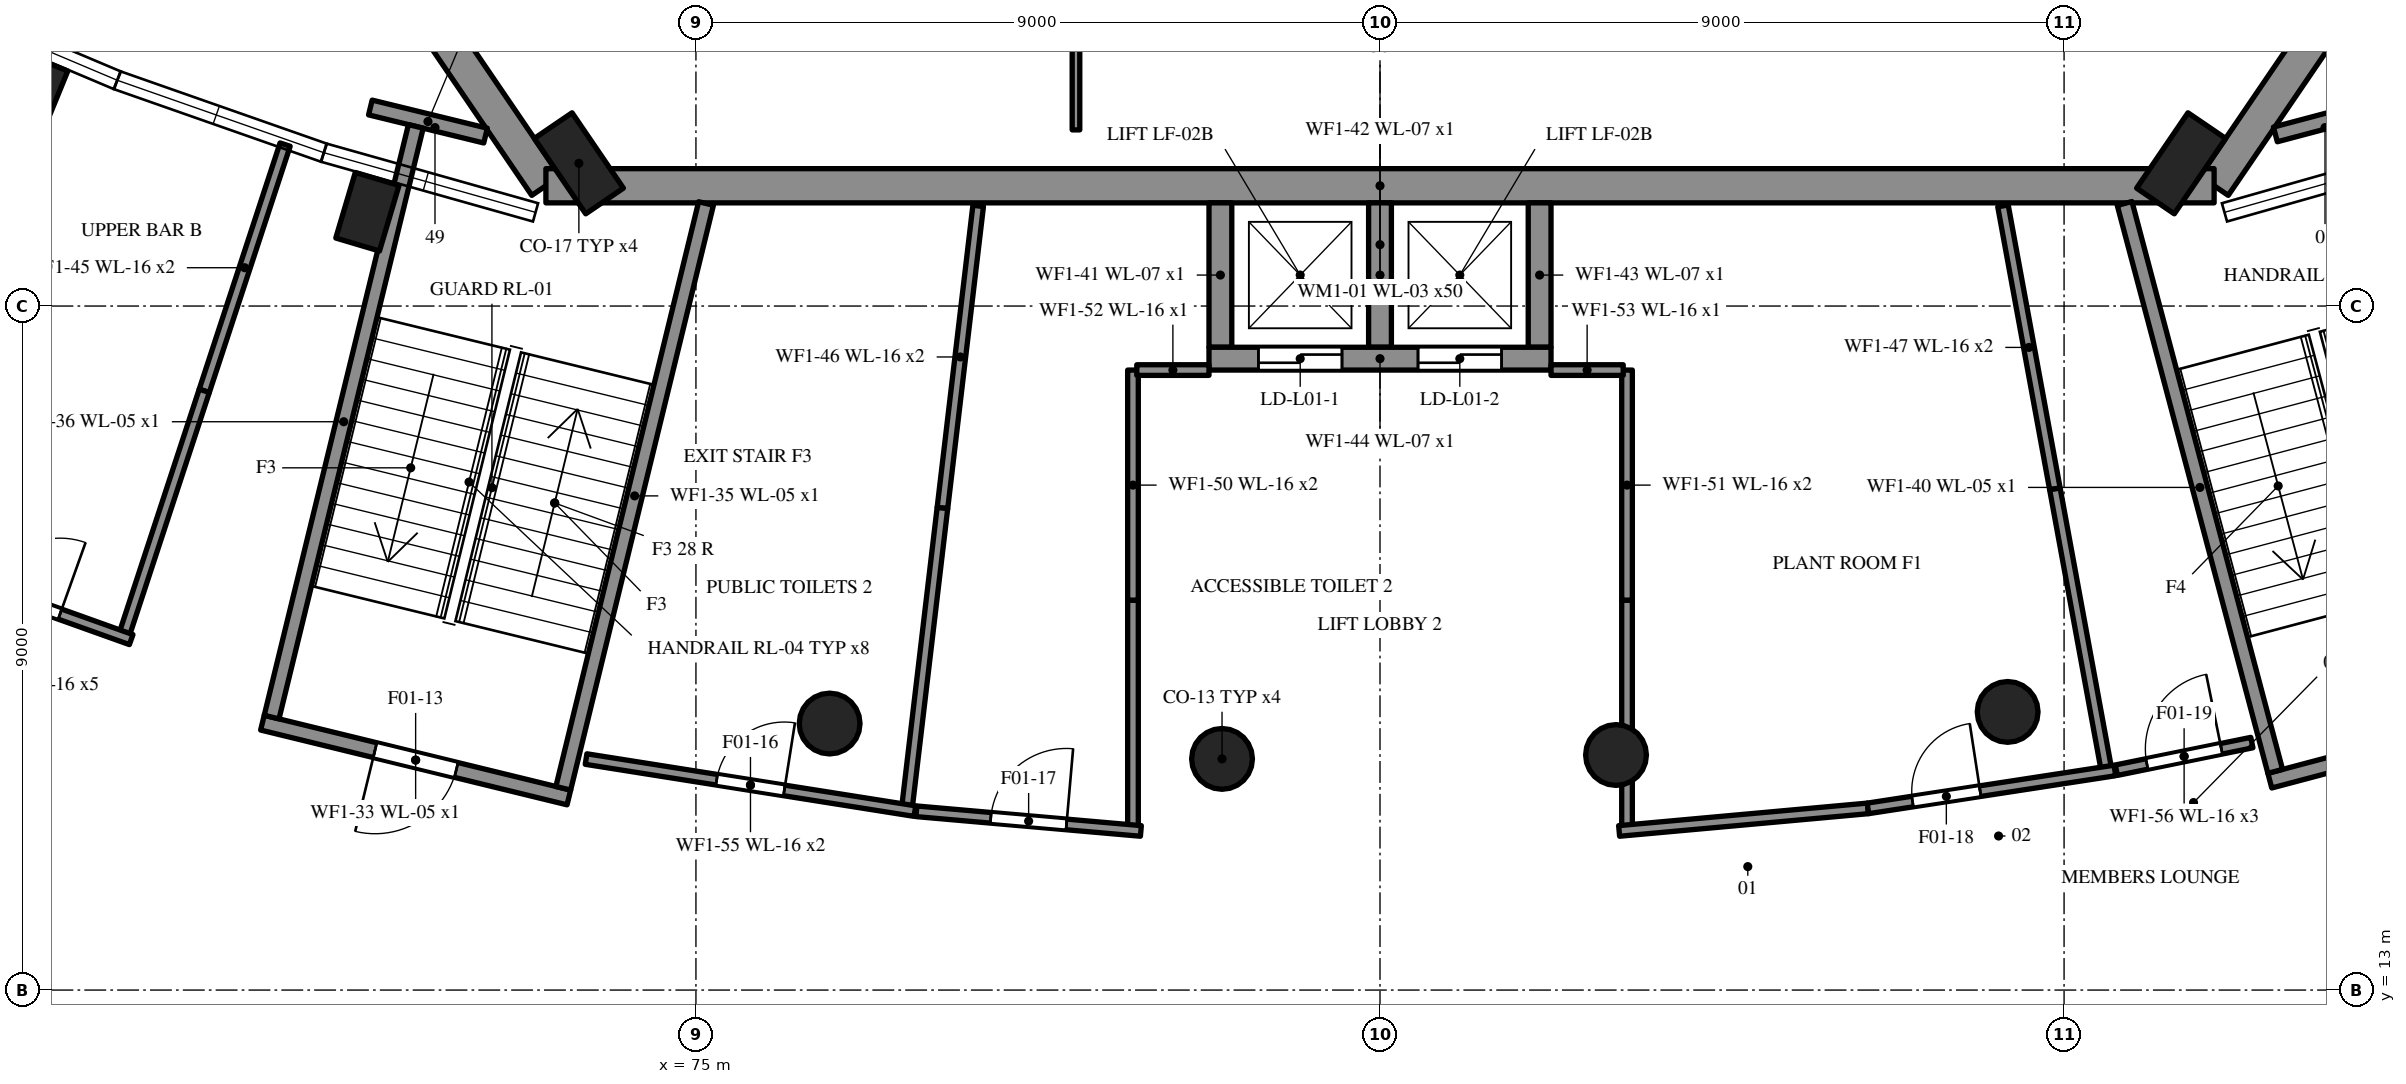
"""IFC4 building model, lengths in metres.
Left out: names, types, materials, properties, quantities, classifications, styles, units other than length and angle.
Written with IfcOpenShell. Run it as: python <this file> out.ifc"""

import sys

from ifc_helpers import new_model, si_unit, direction, frame, frame_2d, origin, origin_2d, place, context, subcontext, project, spatial, rectangle, circle, extrude, element, fill, save


model = new_model("IFC4")
c1 = context("Model", 3, precision=1e-05, world=origin(), true_north=direction((0.0, 1.0)))
c2 = subcontext(c1, "Body", "Model", "MODEL_VIEW")
j1 = project(units=[si_unit("LENGTHUNIT", "METRE"), si_unit("PLANEANGLEUNIT", "RADIAN")], contexts=[c1])
p1 = place(None, origin())
s1 = spatial("IfcSite", under=j1, at=p1, CompositionType="ELEMENT")
p2 = place(p1, origin())
s2 = spatial("IfcBuilding", under=s1, at=p2, CompositionType="ELEMENT")
p3 = place(p2, frame((0.0, 0.0, 5.4)))
s3 = spatial("IfcBuildingStorey", under=s2, at=p3, CompositionType="ELEMENT", Elevation=5.4)
for number, where, z_axis, x_axis in (
    (1, (94.974, 23.583, 0.0), (0.0, 0.0, 1.0), (0.563, 0.826, 0.0)),
    (2, (71.389, 25.986, 0.0), (0.0, 0.0, 1.0), (0.563, -0.826, 0.0)),
):
    element("IfcWall", number, at=place(p3, frame(where, z_axis=z_axis, x_axis=x_axis)), inside=s3, PredefinedType="SOLIDWALL", context=c2, shape_type="SweptSolid", body=[
        extrude(rectangle(XDim=2.908, YDim=0.45, at=frame_2d((1.454, 0.0))), origin(), (0.0, 0.0, 1.0), 4.8),
    ])
p4 = place(p3, frame((73.026, 23.583, 0.0), z_axis=(0.0, 0.0, 1.0), x_axis=(1.0, 0.0, 0.0)))
e3 = element("IfcWall", 3, at=p4, inside=s3, PredefinedType="SOLIDWALL", context=c2, shape_type="SweptSolid", body=[
    extrude(rectangle(XDim=21.948, YDim=0.45, at=frame_2d((10.974, 0.0))), origin(), (0.0, 0.0, 1.0), 4.8),
])
for number, where, z_axis, x_axis in (
    (4, (94.54, 23.878, 0.0), (0.0, 0.0, 1.0), (0.563, 0.826, 0.0)),
    (5, (73.46, 23.878, 0.0), (0.0, 0.0, 1.0), (0.563, -0.826, 0.0)),
):
    element("IfcColumn", number, at=place(p3, frame(where, z_axis=z_axis, x_axis=x_axis)), inside=s3, PredefinedType="PILASTER", context=c2, shape_type="SweptSolid", body=[
        extrude(rectangle(XDim=1.2, YDim=0.6, at=origin_2d()), origin(), (0.0, 0.0, 1.0), 4.8),
    ])
for number, where, z_axis, x_axis in (
    (6, (66.287, 24.79, 0.0), (0.0, 0.0, 1.0), (-0.379, -0.925, 0.0)),
    (7, (70.677, 23.241, 0.0), (0.0, 0.0, 1.0), (-0.285, -0.958, 0.0)),
):
    element("IfcColumn", number, at=place(p3, frame(where, z_axis=z_axis, x_axis=x_axis)), inside=s3, PredefinedType="PILASTER", context=c2, shape_type="SweptSolid", body=[
        extrude(rectangle(XDim=0.9, YDim=0.6, at=origin_2d()), origin(), (0.0, 0.0, 1.0), 4.8),
    ])
for number, where, z_axis, x_axis in (
    (8, (76.759, 16.507, 0.0), (0.0, 0.0, 1.0), (1.0, 0.0, 0.0)),
    (9, (81.922, 16.042, 0.0), (0.0, 0.0, 1.0), (1.0, 0.0, 0.0)),
    (10, (87.105, 16.093, 0.0), (0.0, 0.0, 1.0), (1.0, 0.0, 0.0)),
    (11, (92.258, 16.66, 0.0), (0.0, 0.0, 1.0), (1.0, 0.0, 0.0)),
):
    element("IfcColumn", number, at=place(p3, frame(where, z_axis=z_axis, x_axis=x_axis)), inside=s3, PredefinedType="COLUMN", context=c2, shape_type="SweptSolid", body=[
        extrude(circle(Radius=0.4, at=origin_2d()), origin(), (0.0, 0.0, 1.0), 4.8),
    ])
p5 = place(p3, frame((80.0, 24.318, 0.0), z_axis=(0.0, 0.0, 1.0), x_axis=(0.0, 1.0, 0.0)))
e12 = element("IfcWall", 12, at=p5, inside=s3, PredefinedType="PARTITIONING", context=c2, shape_type="SweptSolid", body=[
    extrude(rectangle(XDim=5.012, YDim=0.1, at=frame_2d((2.506, 0.0))), origin(), (0.0, 0.0, 1.0), 4.55),
])
p6 = place(p3, frame((73.328, 15.534, 0.0), z_axis=(0.0, 0.0, 1.0), x_axis=(-0.97147374422, 0.237147136374, 0.0)))
e13 = element("IfcWall", 13, at=p6, inside=s3, PredefinedType="SHEAR", context=c2, shape_type="SweptSolid", body=[
    extrude(rectangle(XDim=4.15, YDim=0.2, at=frame_2d((2.075, 0.0))), origin(), (0.0, 0.0, 1.0), 4.8),
])
p7 = place(p6, frame((1.525, 0.0, 0.0)))
e14 = element("IfcOpeningElement", 14, at=p7, cuts=e13, PredefinedType="OPENING", context=c2, shape_type="SweptSolid", body=[
    extrude(rectangle(XDim=1.1, YDim=2.1, at=frame_2d((0.55, 1.05))), frame((0.0, 0.11, 0.0), z_axis=(0.0, -1.0, 0.0), x_axis=(1.0, 0.0, 0.0)), (0.0, 0.0, 1.0), 0.22),
])
p8 = place(p3, frame((72.232, 24.242, 0.0), z_axis=(0.0, 0.0, 1.0), x_axis=(-0.971444715638, 0.237266020446, 0.0)))
e15 = element("IfcWall", 15, at=p8, inside=s3, PredefinedType="SHEAR", context=c2, shape_type="SweptSolid", body=[
    extrude(rectangle(XDim=1.56, YDim=0.2, at=frame_2d((0.78, 0.0))), origin(), (0.0, 0.0, 1.0), 4.8),
])
p9 = place(p3, frame((73.255, 15.655, 0.0), z_axis=(0.0, 0.0, 1.0), x_axis=(0.237142809453, 0.971474800458, 0.0)))
e16 = element("IfcWall", 16, at=p9, inside=s3, PredefinedType="SHEAR", context=c2, shape_type="SweptSolid", body=[
    extrude(rectangle(XDim=7.92, YDim=0.2, at=frame_2d((3.96, 0.0))), origin(), (0.0, 0.0, 1.0), 4.8),
])
p10 = place(p3, frame((69.417, 16.592, 0.0), z_axis=(0.0, 0.0, 1.0), x_axis=(0.2371535898, 0.971472168847, 0.0)))
e17 = element("IfcWall", 17, at=p10, inside=s3, PredefinedType="SHEAR", context=c2, shape_type="SweptSolid", body=[
    extrude(rectangle(XDim=8.0, YDim=0.2, at=frame_2d((4.0, 0.0))), origin(), (0.0, 0.0, 1.0), 4.8),
])
p11 = place(p3, frame((99.718, 16.819, 0.0), z_axis=(0.0, 0.0, 1.0), x_axis=(-0.966590417756, -0.256325894715, 0.0)))
e18 = element("IfcWall", 18, at=p11, inside=s3, PredefinedType="SHEAR", context=c2, shape_type="SweptSolid", body=[
    extrude(rectangle(XDim=4.15, YDim=0.2, at=frame_2d((2.075, 0.0))), origin(), (0.0, 0.0, 1.0), 4.8),
])
p12 = place(p11, frame((1.525, 0.0, 0.0)))
e19 = element("IfcOpeningElement", 19, at=p12, cuts=e18, PredefinedType="OPENING", context=c2, shape_type="SweptSolid", body=[
    extrude(rectangle(XDim=1.1, YDim=2.1, at=frame_2d((0.55, 1.05))), frame((0.0, 0.11, 0.0), z_axis=(0.0, -1.0, 0.0), x_axis=(1.0, 0.0, 0.0)), (0.0, 0.0, 1.0), 0.22),
])
p13 = place(p3, frame((98.138, 24.884, 0.0), z_axis=(0.0, 0.0, 1.0), x_axis=(-0.966582812495, -0.256354572009, 0.0)))
e20 = element("IfcWall", 20, at=p13, inside=s3, PredefinedType="SHEAR", context=c2, shape_type="SweptSolid", body=[
    extrude(rectangle(XDim=2.44, YDim=0.2, at=frame_2d((1.22, 0.0))), origin(), (0.0, 0.0, 1.0), 4.8),
])
p14 = place(p3, frame((95.778, 15.878, 0.0), z_axis=(0.0, 0.0, 1.0), x_axis=(-0.256333531377, 0.966588392591, 0.0)))
e21 = element("IfcWall", 21, at=p14, inside=s3, PredefinedType="SHEAR", context=c2, shape_type="SweptSolid", body=[
    extrude(rectangle(XDim=7.73, YDim=0.2, at=frame_2d((3.865, 0.0))), origin(), (0.0, 0.0, 1.0), 4.8),
])
for number, where, z_axis, x_axis in (
    (22, (81.9, 21.458, 0.0), (0.0, 0.0, 1.0), (0.0, 1.0, 0.0)),
    (23, (84.0, 21.458, 0.0), (0.0, 0.0, 1.0), (0.0, 1.0, 0.0)),
    (24, (86.1, 21.458, 0.0), (0.0, 0.0, 1.0), (0.0, 1.0, 0.0)),
):
    element("IfcWall", number, at=place(p3, frame(where, z_axis=z_axis, x_axis=x_axis)), inside=s3, PredefinedType="SHEAR", context=c2, shape_type="SweptSolid", body=[
        extrude(rectangle(XDim=1.9, YDim=0.3, at=frame_2d((0.95, 0.0))), origin(), (0.0, 0.0, 1.0), 4.8),
    ])
p15 = place(p3, frame((81.75, 21.308, 0.0), z_axis=(0.0, 0.0, 1.0), x_axis=(1.0, 0.0, 0.0)))
e25 = element("IfcWall", 25, at=p15, inside=s3, PredefinedType="SHEAR", context=c2, shape_type="SweptSolid", body=[
    extrude(rectangle(XDim=4.5, YDim=0.3, at=frame_2d((2.25, 0.0))), origin(), (0.0, 0.0, 1.0), 4.8),
])
p16 = place(p15, frame((0.65, 0.0, 0.0)))
e26 = element("IfcOpeningElement", 26, at=p16, cuts=e25, PredefinedType="OPENING", context=c2, shape_type="SweptSolid", body=[
    extrude(rectangle(XDim=1.1, YDim=2.2, at=frame_2d((0.55, 1.1))), frame((0.0, 0.16, 0.0), z_axis=(0.0, -1.0, 0.0), x_axis=(1.0, 0.0, 0.0)), (0.0, 0.0, 1.0), 0.32),
])
p17 = place(p15, frame((2.75, 0.0, 0.0)))
e27 = element("IfcOpeningElement", 27, at=p17, cuts=e25, PredefinedType="OPENING", context=c2, shape_type="SweptSolid", body=[
    extrude(rectangle(XDim=1.1, YDim=2.2, at=frame_2d((0.55, 1.1))), frame((0.0, 0.16, 0.0), z_axis=(0.0, -1.0, 0.0), x_axis=(1.0, 0.0, 0.0)), (0.0, 0.0, 1.0), 0.32),
])
p18 = place(p3, frame((69.595, 24.124, 0.0), z_axis=(0.0, 0.0, 1.0), x_axis=(-0.311928968211, -0.950105425093, 0.0)))
e28 = element("IfcWall", 28, at=p18, inside=s3, PredefinedType="PARTITIONING", context=c2, shape_type="SweptSolid", body=[
    extrude(rectangle(XDim=3.41, YDim=0.14, at=frame_2d((1.705, 0.0))), origin(), (0.0, 0.0, 1.0), 4.634),
])
p19 = place(p3, frame((68.531, 20.884, 0.0), z_axis=(0.0, 0.0, 1.0), x_axis=(-0.311917422886, -0.950109215459, 0.0)))
e29 = element("IfcWall", 29, at=p19, inside=s3, PredefinedType="PARTITIONING", context=c2, shape_type="SweptSolid", body=[
    extrude(rectangle(XDim=3.35, YDim=0.14, at=frame_2d((1.675, 0.0))), origin(), (0.0, 0.0, 1.0), 4.634),
])
p20 = place(p3, frame((78.713, 23.318, 0.0), z_axis=(0.0, 0.0, 1.0), x_axis=(-0.117524162316, -0.993070023348, 0.0)))
e30 = element("IfcWall", 30, at=p20, inside=s3, PredefinedType="PARTITIONING", context=c2, shape_type="SweptSolid", body=[
    extrude(rectangle(XDim=4.003, YDim=0.14, at=frame_2d((2.001, 0.0))), origin(), (0.0, 0.0, 1.0), 4.58),
])
p21 = place(p3, frame((78.243, 19.342, 0.0), z_axis=(0.0, 0.0, 1.0), x_axis=(-0.117462752038, -0.993077288978, 0.0)))
e31 = element("IfcWall", 31, at=p21, inside=s3, PredefinedType="PARTITIONING", context=c2, shape_type="SweptSolid", body=[
    extrude(rectangle(XDim=3.943, YDim=0.14, at=frame_2d((1.971, 0.0))), origin(), (0.0, 0.0, 1.0), 4.58),
])
p22 = place(p3, frame((92.196, 23.318, 0.0), z_axis=(0.0, 0.0, 1.0), x_axis=(0.180428728445, -0.983588061107, 0.0)))
e32 = element("IfcWall", 32, at=p22, inside=s3, PredefinedType="PARTITIONING", context=c2, shape_type="SweptSolid", body=[
    extrude(rectangle(XDim=3.786, YDim=0.14, at=frame_2d((1.893, 0.0))), origin(), (0.0, 0.0, 1.0), 4.58),
])
p23 = place(p3, frame((92.879, 19.594, 0.0), z_axis=(0.0, 0.0, 1.0), x_axis=(0.18037858071, -0.983597258852, 0.0)))
e33 = element("IfcWall", 33, at=p23, inside=s3, PredefinedType="PARTITIONING", context=c2, shape_type="SweptSolid", body=[
    extrude(rectangle(XDim=3.726, YDim=0.14, at=frame_2d((1.863, 0.0))), origin(), (0.0, 0.0, 1.0), 4.58),
])
p24 = place(p3, frame((80.75, 15.163, 0.0), z_axis=(0.0, 0.0, 1.0), x_axis=(0.0, 1.0, 0.0)))
e34 = element("IfcWall", 34, at=p24, inside=s3, PredefinedType="PARTITIONING", context=c2, shape_type="SweptSolid", body=[
    extrude(rectangle(XDim=2.967, YDim=0.14, at=frame_2d((1.484, 0.0))), origin(), (0.0, 0.0, 1.0), 4.58),
])
p25 = place(p3, frame((80.75, 18.13, 0.0), z_axis=(0.0, 0.0, 1.0), x_axis=(0.0, 1.0, 0.0)))
e35 = element("IfcWall", 35, at=p25, inside=s3, PredefinedType="PARTITIONING", context=c2, shape_type="SweptSolid", body=[
    extrude(rectangle(XDim=3.027, YDim=0.14, at=frame_2d((1.514, 0.0))), origin(), (0.0, 0.0, 1.0), 4.58),
])
p26 = place(p3, frame((87.25, 15.163, 0.0), z_axis=(0.0, 0.0, 1.0), x_axis=(0.0, 1.0, 0.0)))
e36 = element("IfcWall", 36, at=p26, inside=s3, PredefinedType="PARTITIONING", context=c2, shape_type="SweptSolid", body=[
    extrude(rectangle(XDim=2.967, YDim=0.14, at=frame_2d((1.484, 0.0))), origin(), (0.0, 0.0, 1.0), 4.58),
])
p27 = place(p3, frame((87.25, 18.13, 0.0), z_axis=(0.0, 0.0, 1.0), x_axis=(0.0, 1.0, 0.0)))
e37 = element("IfcWall", 37, at=p27, inside=s3, PredefinedType="PARTITIONING", context=c2, shape_type="SweptSolid", body=[
    extrude(rectangle(XDim=3.027, YDim=0.14, at=frame_2d((1.514, 0.0))), origin(), (0.0, 0.0, 1.0), 4.58),
])
for number, where, z_axis, x_axis in (
    (38, (80.8, 21.158, 0.0), (0.0, 0.0, 1.0), (1.0, 0.0, 0.0)),
    (39, (86.25, 21.158, 0.0), (0.0, 0.0, 1.0), (1.0, 0.0, 0.0)),
):
    element("IfcWall", number, at=place(p3, frame(where, z_axis=z_axis, x_axis=x_axis)), inside=s3, PredefinedType="PARTITIONING", context=c2, shape_type="SweptSolid", body=[
        extrude(rectangle(XDim=0.95, YDim=0.14, at=frame_2d((0.475, 0.0))), origin(), (0.0, 0.0, 1.0), 4.58),
    ])
p28 = place(p3, frame((64.754, 18.618, 0.0), z_axis=(0.0, 0.0, 1.0), x_axis=(0.941592174621, -0.336755366242, 0.0)))
e40 = element("IfcWall", 40, at=p28, inside=s3, PredefinedType="PARTITIONING", context=c2, shape_type="SweptSolid", body=[
    extrude(rectangle(XDim=2.99, YDim=0.14, at=frame_2d((1.495, 0.0))), origin(), (0.0, 0.0, 1.0), 4.634),
])
p29 = place(p28, frame((0.995, 0.0, 0.0)))
e41 = element("IfcOpeningElement", 41, at=p29, cuts=e40, PredefinedType="OPENING", context=c2, shape_type="SweptSolid", body=[
    extrude(rectangle(XDim=1.0, YDim=2.1, at=frame_2d((0.5, 1.05))), frame((0.0, 0.08, 0.0), z_axis=(0.0, -1.0, 0.0), x_axis=(1.0, 0.0, 0.0)), (0.0, 0.0, 1.0), 0.16),
])
p30 = place(p3, frame((73.554, 16.04, 0.0), z_axis=(0.0, 0.0, 1.0), x_axis=(0.987693268679, -0.156403347173, 0.0)))
e42 = element("IfcWall", 42, at=p30, inside=s3, PredefinedType="PARTITIONING", context=c2, shape_type="SweptSolid", body=[
    extrude(rectangle(XDim=4.38, YDim=0.14, at=frame_2d((2.19, 0.0))), origin(), (0.0, 0.0, 1.0), 4.58),
])
p31 = place(p30, frame((1.74, 0.0, 0.0)))
e43 = element("IfcOpeningElement", 43, at=p31, cuts=e42, PredefinedType="OPENING", context=c2, shape_type="SweptSolid", body=[
    extrude(rectangle(XDim=0.9, YDim=2.1, at=frame_2d((0.45, 1.05))), frame((0.0, 0.08, 0.0), z_axis=(0.0, -1.0, 0.0), x_axis=(1.0, 0.0, 0.0)), (0.0, 0.0, 1.0), 0.16),
])
p32 = place(p3, frame((77.9, 15.352, 0.0), z_axis=(0.0, 0.0, 1.0), x_axis=(0.996183521579, -0.087283396667, 0.0)))
e44 = element("IfcWall", 44, at=p32, inside=s3, PredefinedType="PARTITIONING", context=c2, shape_type="SweptSolid", body=[
    extrude(rectangle(XDim=2.965, YDim=0.14, at=frame_2d((1.482, 0.0))), origin(), (0.0, 0.0, 1.0), 4.58),
])
p33 = place(p32, frame((0.982, 0.0, 0.0)))
e45 = element("IfcOpeningElement", 45, at=p33, cuts=e44, PredefinedType="OPENING", context=c2, shape_type="SweptSolid", body=[
    extrude(rectangle(XDim=1.0, YDim=2.1, at=frame_2d((0.5, 1.05))), frame((0.0, 0.08, 0.0), z_axis=(0.0, -1.0, 0.0), x_axis=(1.0, 0.0, 0.0)), (0.0, 0.0, 1.0), 0.16),
])
p34 = place(p3, frame((87.146, 15.094, 0.0), z_axis=(0.0, 0.0, 1.0), x_axis=(0.995913271916, 0.090314754169, 0.0)))
e46 = element("IfcWall", 46, at=p34, inside=s3, PredefinedType="PARTITIONING", context=c2, shape_type="SweptSolid", body=[
    extrude(rectangle(XDim=3.287, YDim=0.14, at=frame_2d((1.644, 0.0))), origin(), (0.0, 0.0, 1.0), 4.58),
])
p35 = place(p3, frame((90.42, 15.39, 0.0), z_axis=(0.0, 0.0, 1.0), x_axis=(0.988407735118, 0.151822755736, 0.0)))
e47 = element("IfcWall", 47, at=p35, inside=s3, PredefinedType="PARTITIONING", context=c2, shape_type="SweptSolid", body=[
    extrude(rectangle(XDim=3.287, YDim=0.14, at=frame_2d((1.644, 0.0))), origin(), (0.0, 0.0, 1.0), 4.58),
])
p36 = place(p35, frame((0.594, 0.0, 0.0)))
e48 = element("IfcOpeningElement", 48, at=p36, cuts=e47, PredefinedType="OPENING", context=c2, shape_type="SweptSolid", body=[
    extrude(rectangle(XDim=0.9, YDim=2.1, at=frame_2d((0.45, 1.05))), frame((0.0, 0.08, 0.0), z_axis=(0.0, -1.0, 0.0), x_axis=(1.0, 0.0, 0.0)), (0.0, 0.0, 1.0), 0.16),
])
p37 = place(p3, frame((93.688, 15.893, 0.0), z_axis=(0.0, 0.0, 1.0), x_axis=(0.979888212279, 0.199547216058, 0.0)))
e49 = element("IfcWall", 49, at=p37, inside=s3, PredefinedType="PARTITIONING", context=c2, shape_type="SweptSolid", body=[
    extrude(rectangle(XDim=1.819, YDim=0.14, at=frame_2d((0.91, 0.0))), origin(), (0.0, 0.0, 1.0), 4.58),
])
p38 = place(p37, frame((0.41, 0.0, 0.0)))
e50 = element("IfcOpeningElement", 50, at=p38, cuts=e49, PredefinedType="OPENING", context=c2, shape_type="SweptSolid", body=[
    extrude(rectangle(XDim=1.0, YDim=2.1, at=frame_2d((0.5, 1.05))), frame((0.0, 0.08, 0.0), z_axis=(0.0, -1.0, 0.0), x_axis=(1.0, 0.0, 0.0)), (0.0, 0.0, 1.0), 0.16),
])
p39 = place(p7, origin())
e51 = element("IfcDoor", 51, at=p39, inside=s3, OperationType="SINGLE_SWING_RIGHT", PredefinedType="DOOR", context=c2, shape_type="SweptSolid", body=[
    extrude(rectangle(XDim=1.1, YDim=2.1, at=frame_2d((0.55, 1.05))), frame((0.0, 0.025, 0.0), z_axis=(0.0, -1.0, 0.0), x_axis=(1.0, 0.0, 0.0)), (0.0, 0.0, 1.0), 0.05),
])
fill(e14, e51)
p40 = place(p16, origin())
e52 = element("IfcDoor", 52, at=p40, inside=s3, OperationType="SLIDING_TO_LEFT", PredefinedType="DOOR", context=c2, shape_type="SweptSolid", body=[
    extrude(rectangle(XDim=1.1, YDim=2.2, at=frame_2d((0.55, 1.1))), frame((0.0, 0.025, 0.0), z_axis=(0.0, -1.0, 0.0), x_axis=(1.0, 0.0, 0.0)), (0.0, 0.0, 1.0), 0.05),
])
fill(e26, e52)
p41 = place(p17, origin())
e53 = element("IfcDoor", 53, at=p41, inside=s3, OperationType="SLIDING_TO_LEFT", PredefinedType="DOOR", context=c2, shape_type="SweptSolid", body=[
    extrude(rectangle(XDim=1.1, YDim=2.2, at=frame_2d((0.55, 1.1))), frame((0.0, 0.025, 0.0), z_axis=(0.0, -1.0, 0.0), x_axis=(1.0, 0.0, 0.0)), (0.0, 0.0, 1.0), 0.05),
])
fill(e27, e53)
p42 = place(p29, origin())
e54 = element("IfcDoor", 54, at=p42, inside=s3, OperationType="SINGLE_SWING_RIGHT", PredefinedType="DOOR", context=c2, shape_type="SweptSolid", body=[
    extrude(rectangle(XDim=1.0, YDim=2.1, at=frame_2d((0.5, 1.05))), frame((0.0, 0.025, 0.0), z_axis=(0.0, -1.0, 0.0), x_axis=(1.0, 0.0, 0.0)), (0.0, 0.0, 1.0), 0.05),
])
fill(e41, e54)
p43 = place(p31, origin())
e55 = element("IfcDoor", 55, at=p43, inside=s3, OperationType="SINGLE_SWING_RIGHT", PredefinedType="DOOR", context=c2, shape_type="SweptSolid", body=[
    extrude(rectangle(XDim=0.9, YDim=2.1, at=frame_2d((0.45, 1.05))), frame((0.0, 0.025, 0.0), z_axis=(0.0, -1.0, 0.0), x_axis=(1.0, 0.0, 0.0)), (0.0, 0.0, 1.0), 0.05),
])
fill(e43, e55)
p44 = place(p33, origin())
e56 = element("IfcDoor", 56, at=p44, inside=s3, OperationType="SINGLE_SWING_RIGHT", PredefinedType="DOOR", context=c2, shape_type="SweptSolid", body=[
    extrude(rectangle(XDim=1.0, YDim=2.1, at=frame_2d((0.5, 1.05))), frame((0.0, 0.025, 0.0), z_axis=(0.0, -1.0, 0.0), x_axis=(1.0, 0.0, 0.0)), (0.0, 0.0, 1.0), 0.05),
])
fill(e45, e56)
p45 = place(p36, origin())
e57 = element("IfcDoor", 57, at=p45, inside=s3, OperationType="SINGLE_SWING_RIGHT", PredefinedType="DOOR", context=c2, shape_type="SweptSolid", body=[
    extrude(rectangle(XDim=0.9, YDim=2.1, at=frame_2d((0.45, 1.05))), frame((0.0, 0.025, 0.0), z_axis=(0.0, -1.0, 0.0), x_axis=(1.0, 0.0, 0.0)), (0.0, 0.0, 1.0), 0.05),
])
fill(e48, e57)
p46 = place(p38, origin())
e58 = element("IfcDoor", 58, at=p46, inside=s3, OperationType="SINGLE_SWING_RIGHT", PredefinedType="DOOR", context=c2, shape_type="SweptSolid", body=[
    extrude(rectangle(XDim=1.0, YDim=2.1, at=frame_2d((0.5, 1.05))), frame((0.0, 0.025, 0.0), z_axis=(0.0, -1.0, 0.0), x_axis=(1.0, 0.0, 0.0)), (0.0, 0.0, 1.0), 0.05),
])
fill(e50, e58)
save(model, sys.argv[1])
